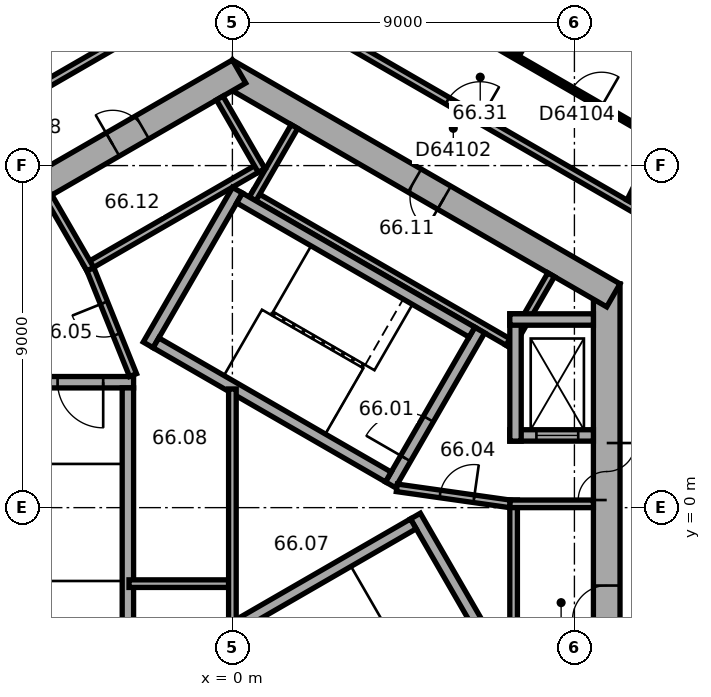
"""IFC4 building model, lengths in metres.
Left out: names, types, materials, properties, quantities, classifications, styles, units other than length and angle.
Written with IfcOpenShell. Run it as: python <this file> out.ifc"""

import sys

from ifc_helpers import new_model, si_unit, direction, frame, frame_2d, origin, place, context, subcontext, project, spatial, rectangle, extrude, element, fill, save


model = new_model("IFC4")
c1 = context("Model", 3, precision=1e-05, world=origin(), true_north=direction((0.0, 1.0)))
c2 = subcontext(c1, "Body", "Model", "MODEL_VIEW")
j1 = project(units=[si_unit("LENGTHUNIT", "METRE"), si_unit("PLANEANGLEUNIT", "RADIAN")], contexts=[c1])
p1 = place(None, origin())
s1 = spatial("IfcSite", under=j1, at=p1, CompositionType="ELEMENT")
p2 = place(p1, origin())
s2 = spatial("IfcBuilding", under=s1, at=p2, CompositionType="ELEMENT")
p3 = place(p2, frame((0.0, 0.0, 267.2)))
s3 = spatial("IfcBuildingStorey", under=s2, at=p3, CompositionType="ELEMENT", Elevation=267.2)
p4 = place(p3, frame((9.85, -5.889, 0.0), z_axis=(0.0, 0.0, 1.0), x_axis=(0.0, 1.0, 0.0)))
e1 = element("IfcWall", 1, at=p4, inside=s3, PredefinedType="SHEAR", context=c2, shape_type="SweptSolid", body=[
    extrude(rectangle(XDim=11.778, YDim=0.7, at=frame_2d((5.889, 0.0))), origin(), (0.0, 0.0, 1.0), 3.7),
])
p5 = place(p4, frame((6.089, 0.0, 0.0)))
e2 = element("IfcOpeningElement", 2, at=p5, cuts=e1, PredefinedType="OPENING", context=c2, shape_type="SweptSolid", body=[
    extrude(rectangle(XDim=1.5, YDim=2.1, at=frame_2d((0.75, 1.05))), frame((0.0, 0.36, 0.0), z_axis=(0.0, -1.0, 0.0), x_axis=(1.0, 0.0, 0.0)), (0.0, 0.0, 1.0), 0.72),
])
p6 = place(p4, frame((2.939, 0.0, 0.0)))
e3 = element("IfcOpeningElement", 3, at=p6, cuts=e1, PredefinedType="OPENING", context=c2, shape_type="SweptSolid", body=[
    extrude(rectangle(XDim=0.9, YDim=2.1, at=frame_2d((0.45, 1.05))), frame((0.0, 0.36, 0.0), z_axis=(0.0, -1.0, 0.0), x_axis=(1.0, 0.0, 0.0)), (0.0, 0.0, 1.0), 0.72),
])
p7 = place(p3, frame((10.025, 5.586, 0.0), z_axis=(0.0, 0.0, 1.0), x_axis=(-0.866026453023, 0.499998182661, 0.0)))
e4 = element("IfcWall", 4, at=p7, inside=s3, PredefinedType="SHEAR", context=c2, shape_type="SweptSolid", body=[
    extrude(rectangle(XDim=11.778, YDim=0.7, at=frame_2d((5.889, 0.0))), origin(), (0.0, 0.0, 1.0), 3.7),
])
p8 = place(p7, frame((5.139, 0.0, 0.0)))
e5 = element("IfcOpeningElement", 5, at=p8, cuts=e4, PredefinedType="OPENING", context=c2, shape_type="SweptSolid", body=[
    extrude(rectangle(XDim=0.9, YDim=2.1, at=frame_2d((0.45, 1.05))), frame((0.0, 0.36, 0.0), z_axis=(0.0, -1.0, 0.0), x_axis=(1.0, 0.0, 0.0)), (0.0, 0.0, 1.0), 0.72),
])
p9 = place(p3, frame((0.175, 11.475, 0.0), z_axis=(0.0, 0.0, 1.0), x_axis=(-0.866026453023, -0.499998182661, 0.0)))
e6 = element("IfcWall", 6, at=p9, inside=s3, PredefinedType="SHEAR", context=c2, shape_type="SweptSolid", body=[
    extrude(rectangle(XDim=11.778, YDim=0.7, at=frame_2d((5.889, 0.0))), origin(), (0.0, 0.0, 1.0), 3.7),
])
p10 = place(p9, frame((6.089, 0.0, 0.0)))
e7 = element("IfcOpeningElement", 7, at=p10, cuts=e6, PredefinedType="OPENING", context=c2, shape_type="SweptSolid", body=[
    extrude(rectangle(XDim=1.5, YDim=2.1, at=frame_2d((0.75, 1.05))), frame((0.0, 0.36, 0.0), z_axis=(0.0, -1.0, 0.0), x_axis=(1.0, 0.0, 0.0)), (0.0, 0.0, 1.0), 0.72),
])
p11 = place(p9, frame((2.939, 0.0, 0.0)))
e8 = element("IfcOpeningElement", 8, at=p11, cuts=e6, PredefinedType="OPENING", context=c2, shape_type="SweptSolid", body=[
    extrude(rectangle(XDim=0.9, YDim=2.1, at=frame_2d((0.45, 1.05))), frame((0.0, 0.36, 0.0), z_axis=(0.0, -1.0, 0.0), x_axis=(1.0, 0.0, 0.0)), (0.0, 0.0, 1.0), 0.72),
])
p12 = place(p3, frame((-2.624, 20.713, 0.0), z_axis=(0.0, 0.0, 1.0), x_axis=(-0.866026460444, -0.499998169808, 0.0)))
e9 = element("IfcWall", 9, at=p12, inside=s3, PredefinedType="STANDARD", context=c2, shape_type="SweptSolid", body=[
    extrude(rectangle(XDim=17.731, YDim=0.2, at=frame_2d((8.866, 0.0))), origin(), (0.0, 0.0, 1.0), 3.7),
])
p13 = place(p12, frame((1.203, 0.0, 0.9)))
e10 = element("IfcOpeningElement", 10, at=p13, cuts=e9, PredefinedType="OPENING", context=c2, shape_type="SweptSolid", body=[
    extrude(rectangle(XDim=2.0, YDim=2.0, at=frame_2d((1.0, 1.0))), frame((0.0, 0.11, 0.0), z_axis=(0.0, -1.0, 0.0), x_axis=(1.0, 0.0, 0.0)), (0.0, 0.0, 1.0), 0.22),
])
p14 = place(p12, frame((4.535, 0.0, 0.9)))
e11 = element("IfcOpeningElement", 11, at=p14, cuts=e9, PredefinedType="OPENING", context=c2, shape_type="SweptSolid", body=[
    extrude(rectangle(XDim=2.0, YDim=2.0, at=frame_2d((1.0, 1.0))), frame((0.0, 0.11, 0.0), z_axis=(0.0, -1.0, 0.0), x_axis=(1.0, 0.0, 0.0)), (0.0, 0.0, 1.0), 0.22),
])
p15 = place(p12, frame((7.867, 0.0, 0.9)))
e12 = element("IfcOpeningElement", 12, at=p15, cuts=e9, PredefinedType="OPENING", context=c2, shape_type="SweptSolid", body=[
    extrude(rectangle(XDim=2.0, YDim=2.0, at=frame_2d((1.0, 1.0))), frame((0.0, 0.11, 0.0), z_axis=(0.0, -1.0, 0.0), x_axis=(1.0, 0.0, 0.0)), (0.0, 0.0, 1.0), 0.22),
])
p16 = place(p12, frame((11.198, 0.0, 0.9)))
e13 = element("IfcOpeningElement", 13, at=p16, cuts=e9, PredefinedType="OPENING", context=c2, shape_type="SweptSolid", body=[
    extrude(rectangle(XDim=2.0, YDim=2.0, at=frame_2d((1.0, 1.0))), frame((0.0, 0.11, 0.0), z_axis=(0.0, -1.0, 0.0), x_axis=(1.0, 0.0, 0.0)), (0.0, 0.0, 1.0), 0.22),
])
p17 = place(p12, frame((14.53, 0.0, 0.9)))
e14 = element("IfcOpeningElement", 14, at=p17, cuts=e9, PredefinedType="OPENING", context=c2, shape_type="SweptSolid", body=[
    extrude(rectangle(XDim=2.0, YDim=2.0, at=frame_2d((1.0, 1.0))), frame((0.0, 0.11, 0.0), z_axis=(0.0, -1.0, 0.0), x_axis=(1.0, 0.0, 0.0)), (0.0, 0.0, 1.0), 0.22),
])
p18 = place(p3, frame((7.4, -5.2, 0.0), z_axis=(0.0, 0.0, 1.0), x_axis=(0.0, 1.0, 0.0)))
e15 = element("IfcWall", 15, at=p18, inside=s3, PredefinedType="PARTITIONING", context=c2, shape_type="SweptSolid", body=[
    extrude(rectangle(XDim=5.4, YDim=0.2, at=frame_2d((2.7, 0.0))), origin(), (0.0, 0.0, 1.0), 3.42),
])
p19 = place(p3, frame((7.3, 0.1, 0.0), z_axis=(0.0, 0.0, 1.0), x_axis=(1.0, 0.0, 0.0)))
e16 = element("IfcWall", 16, at=p19, inside=s3, PredefinedType="PARTITIONING", context=c2, shape_type="SweptSolid", body=[
    extrude(rectangle(XDim=2.2, YDim=0.2, at=frame_2d((1.1, 0.0))), origin(), (0.0, 0.0, 1.0), 3.42),
])
p20 = place(p3, frame((7.424, 4.259, 0.0), z_axis=(0.0, 0.0, 1.0), x_axis=(-0.866026010844, 0.49999894854, 0.0)))
e17 = element("IfcWall", 17, at=p20, inside=s3, PredefinedType="PARTITIONING", context=c2, shape_type="SweptSolid", body=[
    extrude(rectangle(XDim=8.0, YDim=0.2, at=frame_2d((4.0, 0.0))), origin(), (0.0, 0.0, 1.0), 3.42),
])
for number, where, z_axis, x_axis in (
    (18, (7.287, 4.222, 0.0), (0.0, 0.0, 1.0), (0.5, 0.866, 0.0)),
    (19, (0.532, 8.122, 0.0), (0.0, 0.0, 1.0), (0.5, 0.866, 0.0)),
):
    element("IfcWall", number, at=place(p3, frame(where, z_axis=z_axis, x_axis=x_axis)), inside=s3, PredefinedType="PARTITIONING", context=c2, shape_type="SweptSolid", body=[
        extrude(rectangle(XDim=2.2, YDim=0.2, at=frame_2d((1.1, 0.0))), origin(), (0.0, 0.0, 1.0), 3.42),
    ])
p21 = place(p3, frame((0.803, 9.009, 0.0), z_axis=(0.0, 0.0, 1.0), x_axis=(-0.866028230842, -0.499995103361, 0.0)))
e20 = element("IfcWall", 20, at=p21, inside=s3, PredefinedType="PARTITIONING", context=c2, shape_type="SweptSolid", body=[
    extrude(rectangle(XDim=5.4, YDim=0.2, at=frame_2d((2.7, 0.0))), origin(), (0.0, 0.0, 1.0), 3.42),
])
p22 = place(p3, frame((0.767, 8.872, 0.0), z_axis=(0.0, 0.0, 1.0), x_axis=(-0.499994660107, 0.866028486751, 0.0)))
e21 = element("IfcWall", 21, at=p22, inside=s3, PredefinedType="PARTITIONING", context=c2, shape_type="SweptSolid", body=[
    extrude(rectangle(XDim=2.2, YDim=0.2, at=frame_2d((1.1, 0.0))), origin(), (0.0, 0.0, 1.0), 3.42),
])
p23 = place(p3, frame((-3.737, 6.272, 0.0), z_axis=(0.0, 0.0, 1.0), x_axis=(-0.50002983664, 0.866008176907, 0.0)))
e22 = element("IfcWall", 22, at=p23, inside=s3, PredefinedType="PARTITIONING", context=c2, shape_type="SweptSolid", body=[
    extrude(rectangle(XDim=2.2, YDim=0.2, at=frame_2d((1.1, 0.0))), origin(), (0.0, 0.0, 1.0), 3.42),
])
p24 = place(p3, frame((4.158, 0.602, 0.0), z_axis=(0.0, 0.0, 1.0), x_axis=(0.499977259774, 0.866038532462, 0.0)))
e23 = element("IfcWall", 23, at=p24, inside=s3, PredefinedType="SHEAR", context=c2, shape_type="SweptSolid", body=[
    extrude(rectangle(XDim=4.7, YDim=0.3, at=frame_2d((2.35, 0.0))), origin(), (0.0, 0.0, 1.0), 3.42),
])
p25 = place(p24, frame((0.8, 0.0, 0.0)))
e24 = element("IfcOpeningElement", 24, at=p25, cuts=e23, PredefinedType="OPENING", context=c2, shape_type="SweptSolid", body=[
    extrude(rectangle(XDim=1.2, YDim=2.1, at=frame_2d((0.6, 1.05))), frame((0.0, 0.16, 0.0), z_axis=(0.0, -1.0, 0.0), x_axis=(1.0, 0.0, 0.0)), (0.0, 0.0, 1.0), 0.32),
])
p26 = place(p3, frame((-2.216, 4.282, 0.0), z_axis=(0.0, 0.0, 1.0), x_axis=(0.499977259774, 0.866038532462, 0.0)))
e25 = element("IfcWall", 25, at=p26, inside=s3, PredefinedType="SHEAR", context=c2, shape_type="SweptSolid", body=[
    extrude(rectangle(XDim=4.7, YDim=0.3, at=frame_2d((2.35, 0.0))), origin(), (0.0, 0.0, 1.0), 3.42),
])
for number, where, z_axis, x_axis in (
    (26, (4.103, 0.807, 0.0), (0.0, 0.0, 1.0), (-0.866, 0.5, 0.0)),
    (27, (6.303, 4.617, 0.0), (0.0, 0.0, 1.0), (-0.866, 0.5, 0.0)),
):
    element("IfcWall", number, at=place(p3, frame(where, z_axis=z_axis, x_axis=x_axis)), inside=s3, PredefinedType="SHEAR", context=c2, shape_type="SweptSolid", body=[
        extrude(rectangle(XDim=7.06, YDim=0.3, at=frame_2d((3.53, 0.0))), origin(), (0.0, 0.0, 1.0), 3.42),
    ])
p27 = place(p3, frame((-2.6, 3.3, 0.0), z_axis=(0.0, 0.0, 1.0), x_axis=(-1.0, 0.0, 0.0)))
e28 = element("IfcWall", 28, at=p27, inside=s3, PredefinedType="SHEAR", context=c2, shape_type="SweptSolid", body=[
    extrude(rectangle(XDim=4.7, YDim=0.3, at=frame_2d((2.35, 0.0))), origin(), (0.0, 0.0, 1.0), 3.42),
])
p28 = place(p27, frame((0.8, 0.0, 0.0)))
e29 = element("IfcOpeningElement", 29, at=p28, cuts=e28, PredefinedType="OPENING", context=c2, shape_type="SweptSolid", body=[
    extrude(rectangle(XDim=1.2, YDim=2.1, at=frame_2d((0.6, 1.05))), frame((0.0, 0.16, 0.0), z_axis=(0.0, -1.0, 0.0), x_axis=(1.0, 0.0, 0.0)), (0.0, 0.0, 1.0), 0.32),
])
p29 = place(p3, frame((-2.75, 3.15, 0.0), z_axis=(0.0, 0.0, 1.0), x_axis=(0.0, -1.0, 0.0)))
e30 = element("IfcWall", 30, at=p29, inside=s3, PredefinedType="SHEAR", context=c2, shape_type="SweptSolid", body=[
    extrude(rectangle(XDim=7.06, YDim=0.3, at=frame_2d((3.53, 0.0))), origin(), (0.0, 0.0, 1.0), 3.42),
])
p30 = place(p3, frame((4.816, -0.222, 0.0), z_axis=(0.0, 0.0, 1.0), x_axis=(0.499977259774, -0.866038532462, 0.0)))
e31 = element("IfcWall", 31, at=p30, inside=s3, PredefinedType="SHEAR", context=c2, shape_type="SweptSolid", body=[
    extrude(rectangle(XDim=4.7, YDim=0.3, at=frame_2d((2.35, 0.0))), origin(), (0.0, 0.0, 1.0), 3.42),
])
p31 = place(p3, frame((-1.353, -3.957, 0.0), z_axis=(0.0, 0.0, 1.0), x_axis=(0.866027801685, 0.499995846692, 0.0)))
e32 = element("IfcWall", 32, at=p31, inside=s3, PredefinedType="SHEAR", context=c2, shape_type="SweptSolid", body=[
    extrude(rectangle(XDim=7.06, YDim=0.3, at=frame_2d((3.53, 0.0))), origin(), (0.0, 0.0, 1.0), 3.42),
])
p32 = place(p3, frame((7.3, 1.9, 0.0), z_axis=(0.0, 0.0, 1.0), x_axis=(1.0, 0.0, 0.0)))
e33 = element("IfcWall", 33, at=p32, inside=s3, PredefinedType="SHEAR", context=c2, shape_type="SweptSolid", body=[
    extrude(rectangle(XDim=2.2, YDim=0.3, at=frame_2d((1.1, 0.0))), origin(), (0.0, 0.0, 1.0), 3.42),
])
p33 = place(p32, frame((0.7, 0.0, 0.0)))
e34 = element("IfcOpeningElement", 34, at=p33, cuts=e33, PredefinedType="OPENING", context=c2, shape_type="SweptSolid", body=[
    extrude(rectangle(XDim=1.1, YDim=2.1, at=frame_2d((0.55, 1.05))), frame((0.0, 0.16, 0.0), z_axis=(0.0, -1.0, 0.0), x_axis=(1.0, 0.0, 0.0)), (0.0, 0.0, 1.0), 0.32),
])
p34 = place(p3, frame((7.45, 1.75, 0.0), z_axis=(0.0, 0.0, 1.0), x_axis=(0.0, 1.0, 0.0)))
e35 = element("IfcWall", 35, at=p34, inside=s3, PredefinedType="SHEAR", context=c2, shape_type="SweptSolid", body=[
    extrude(rectangle(XDim=3.35, YDim=0.3, at=frame_2d((1.675, 0.0))), origin(), (0.0, 0.0, 1.0), 3.42),
])
p35 = place(p3, frame((7.3, 4.95, 0.0), z_axis=(0.0, 0.0, 1.0), x_axis=(1.0, 0.0, 0.0)))
e36 = element("IfcWall", 36, at=p35, inside=s3, PredefinedType="SHEAR", context=c2, shape_type="SweptSolid", body=[
    extrude(rectangle(XDim=2.2, YDim=0.3, at=frame_2d((1.1, 0.0))), origin(), (0.0, 0.0, 1.0), 3.42),
])
p36 = place(p3, frame((4.327, 0.521, 0.0), z_axis=(0.0, 0.0, 1.0), x_axis=(0.990124376366, -0.14019172346, 0.0)))
e37 = element("IfcWall", 37, at=p36, inside=s3, PredefinedType="PARTITIONING", context=c2, shape_type="SweptSolid", body=[
    extrude(rectangle(XDim=3.002, YDim=0.2, at=frame_2d((1.501, 0.0))), origin(), (0.0, 0.0, 1.0), 3.42),
])
p37 = place(p36, frame((1.15, 0.0, 0.0)))
e38 = element("IfcOpeningElement", 38, at=p37, cuts=e37, PredefinedType="OPENING", context=c2, shape_type="SweptSolid", body=[
    extrude(rectangle(XDim=0.9, YDim=2.1, at=frame_2d((0.45, 1.05))), frame((0.0, 0.11, 0.0), z_axis=(0.0, -1.0, 0.0), x_axis=(1.0, 0.0, 0.0)), (0.0, 0.0, 1.0), 0.22),
])
p38 = place(p3, frame((-2.615, 3.487, 0.0), z_axis=(0.0, 0.0, 1.0), x_axis=(-0.373576831041, 0.92759924068, 0.0)))
e39 = element("IfcWall", 39, at=p38, inside=s3, PredefinedType="PARTITIONING", context=c2, shape_type="SweptSolid", body=[
    extrude(rectangle(XDim=3.002, YDim=0.2, at=frame_2d((1.501, 0.0))), origin(), (0.0, 0.0, 1.0), 3.42),
])
p39 = place(p38, frame((1.15, 0.0, 0.0)))
e40 = element("IfcOpeningElement", 40, at=p39, cuts=e39, PredefinedType="OPENING", context=c2, shape_type="SweptSolid", body=[
    extrude(rectangle(XDim=0.9, YDim=2.1, at=frame_2d((0.45, 1.05))), frame((0.0, 0.11, 0.0), z_axis=(0.0, -1.0, 0.0), x_axis=(1.0, 0.0, 0.0)), (0.0, 0.0, 1.0), 0.22),
])
p40 = place(p3, frame((-2.72, -2.0, 0.0), z_axis=(0.0, 0.0, 1.0), x_axis=(1.0, 0.0, 0.0)))
e41 = element("IfcWall", 41, at=p40, inside=s3, PredefinedType="PARTITIONING", context=c2, shape_type="SweptSolid", body=[
    extrude(rectangle(XDim=2.62, YDim=0.2, at=frame_2d((1.31, 0.0))), origin(), (0.0, 0.0, 1.0), 3.42),
])
p41 = place(p3, frame((0.0, -3.122, 0.0), z_axis=(0.0, 0.0, 1.0), x_axis=(0.0, 1.0, 0.0)))
e42 = element("IfcWall", 42, at=p41, inside=s3, PredefinedType="PARTITIONING", context=c2, shape_type="SweptSolid", body=[
    extrude(rectangle(XDim=6.245, YDim=0.2, at=frame_2d((3.122, 0.0))), origin(), (0.0, 0.0, 1.0), 3.42),
])
p42 = place(p3, frame((-0.95, 13.423, 0.0), z_axis=(0.0, 0.0, 1.0), x_axis=(-0.86603557629, -0.499982380289, 0.0)))
e43 = element("IfcWall", 43, at=p42, inside=s3, PredefinedType="PARTITIONING", context=c2, shape_type="SweptSolid", body=[
    extrude(rectangle(XDim=4.906, YDim=0.2, at=frame_2d((2.453, 0.0))), origin(), (0.0, 0.0, 1.0), 3.42),
])
p43 = place(p3, frame((10.072, 16.376, 0.0), z_axis=(0.0, 0.0, 1.0), x_axis=(-0.499972385701, -0.86604134632, 0.0)))
e44 = element("IfcWall", 44, at=p43, inside=s3, PredefinedType="PARTITIONING", context=c2, shape_type="SweptSolid", body=[
    extrude(rectangle(XDim=5.158, YDim=0.12, at=frame_2d((2.579, 0.0))), origin(), (0.0, 0.0, 1.0), 2.87),
])
p44 = place(p3, frame((11.15, 7.534, 0.0), z_axis=(0.0, 0.0, 1.0), x_axis=(-0.866026603062, 0.499997922785, 0.0)))
e45 = element("IfcWall", 45, at=p44, inside=s3, PredefinedType="PARTITIONING", context=c2, shape_type="SweptSolid", body=[
    extrude(rectangle(XDim=11.738, YDim=0.2, at=frame_2d((5.869, 0.0))), origin(), (0.0, 0.0, 1.0), 3.42),
])
p45 = place(p44, frame((5.345, 0.0, 0.0)))
e46 = element("IfcOpeningElement", 46, at=p45, cuts=e45, PredefinedType="OPENING", context=c2, shape_type="SweptSolid", body=[
    extrude(rectangle(XDim=1.0, YDim=2.1, at=frame_2d((0.5, 1.05))), frame((0.0, 0.11, 0.0), z_axis=(0.0, -1.0, 0.0), x_axis=(1.0, 0.0, 0.0)), (0.0, 0.0, 1.0), 0.22),
])
p46 = place(p3, frame((11.187, 9.707, 0.0), z_axis=(0.0, 0.0, 1.0), x_axis=(-0.866033133531, 0.499986611447, 0.0)))
e47 = element("IfcWall", 47, at=p46, inside=s3, PredefinedType="PARTITIONING", context=c2, shape_type="SweptSolid", body=[
    extrude(rectangle(XDim=9.814, YDim=0.12, at=frame_2d((4.907, 0.0))), origin(), (0.0, 0.0, 1.0), 3.42),
])
p47 = place(p46, frame((8.349, 0.0, 0.0)))
e48 = element("IfcOpeningElement", 48, at=p47, cuts=e47, PredefinedType="OPENING", context=c2, shape_type="SweptSolid", body=[
    extrude(rectangle(XDim=1.0, YDim=2.1, at=frame_2d((0.5, 1.05))), frame((0.0, 0.07, 0.0), z_axis=(0.0, -1.0, 0.0), x_axis=(1.0, 0.0, 0.0)), (0.0, 0.0, 1.0), 0.14),
])
p48 = place(p46, frame((1.7, 0.0, 0.0)))
e49 = element("IfcOpeningElement", 49, at=p48, cuts=e47, PredefinedType="OPENING", context=c2, shape_type="SweptSolid", body=[
    extrude(rectangle(XDim=0.9, YDim=2.1, at=frame_2d((0.45, 1.05))), frame((0.0, 0.07, 0.0), z_axis=(0.0, -1.0, 0.0), x_axis=(1.0, 0.0, 0.0)), (0.0, 0.0, 1.0), 0.14),
])
p49 = place(p46, frame((5.642, 0.0, 0.0)))
e50 = element("IfcOpeningElement", 50, at=p49, cuts=e47, PredefinedType="OPENING", context=c2, shape_type="SweptSolid", body=[
    extrude(rectangle(XDim=0.9, YDim=2.1, at=frame_2d((0.45, 1.05))), frame((0.0, 0.07, 0.0), z_axis=(0.0, -1.0, 0.0), x_axis=(1.0, 0.0, 0.0)), (0.0, 0.0, 1.0), 0.14),
])
p50 = place(p3, frame((13.405, 13.933, 0.0), z_axis=(0.0, 0.0, 1.0), x_axis=(-0.446187838644, -0.894939334618, 0.0)))
e51 = element("IfcWall", 51, at=p50, inside=s3, PredefinedType="PARTITIONING", context=c2, shape_type="SweptSolid", body=[
    extrude(rectangle(XDim=6.571, YDim=0.2, at=frame_2d((3.286, 0.0))), origin(), (0.0, 0.0, 1.0), 3.42),
])
p51 = place(p5, origin())
e52 = element("IfcDoor", 52, at=p51, inside=s3, OperationType="DOUBLE_DOOR_SINGLE_SWING", PredefinedType="DOOR", context=c2, shape_type="SweptSolid", body=[
    extrude(rectangle(XDim=1.5, YDim=2.1, at=frame_2d((0.75, 1.05))), frame((0.0, 0.025, 0.0), z_axis=(0.0, -1.0, 0.0), x_axis=(1.0, 0.0, 0.0)), (0.0, 0.0, 1.0), 0.05),
])
fill(e2, e52)
p52 = place(p25, origin())
e53 = element("IfcDoor", 53, at=p52, inside=s3, OperationType="SINGLE_SWING_RIGHT", PredefinedType="DOOR", context=c2, shape_type="SweptSolid", body=[
    extrude(rectangle(XDim=1.2, YDim=2.1, at=frame_2d((0.6, 1.05))), frame((0.0, 0.025, 0.0), z_axis=(0.0, -1.0, 0.0), x_axis=(1.0, 0.0, 0.0)), (0.0, 0.0, 1.0), 0.05),
])
fill(e24, e53)
p53 = place(p28, origin())
e54 = element("IfcDoor", 54, at=p53, inside=s3, OperationType="SINGLE_SWING_RIGHT", PredefinedType="DOOR", context=c2, shape_type="SweptSolid", body=[
    extrude(rectangle(XDim=1.2, YDim=2.1, at=frame_2d((0.6, 1.05))), frame((0.0, 0.025, 0.0), z_axis=(0.0, -1.0, 0.0), x_axis=(1.0, 0.0, 0.0)), (0.0, 0.0, 1.0), 0.05),
])
fill(e29, e54)
p54 = place(p37, origin())
e55 = element("IfcDoor", 55, at=p54, inside=s3, OperationType="SINGLE_SWING_LEFT", PredefinedType="DOOR", context=c2, shape_type="SweptSolid", body=[
    extrude(rectangle(XDim=0.9, YDim=2.1, at=frame_2d((0.45, 1.05))), frame((0.0, 0.025, 0.0), z_axis=(0.0, -1.0, 0.0), x_axis=(1.0, 0.0, 0.0)), (0.0, 0.0, 1.0), 0.05),
])
fill(e38, e55)
p55 = place(p39, origin())
e56 = element("IfcDoor", 56, at=p55, inside=s3, OperationType="SINGLE_SWING_LEFT", PredefinedType="DOOR", context=c2, shape_type="SweptSolid", body=[
    extrude(rectangle(XDim=0.9, YDim=2.1, at=frame_2d((0.45, 1.05))), frame((0.0, 0.025, 0.0), z_axis=(0.0, -1.0, 0.0), x_axis=(1.0, 0.0, 0.0)), (0.0, 0.0, 1.0), 0.05),
])
fill(e40, e56)
p56 = place(p6, origin())
e57 = element("IfcDoor", 57, at=p56, inside=s3, OperationType="SINGLE_SWING_LEFT", PredefinedType="DOOR", context=c2, shape_type="SweptSolid", body=[
    extrude(rectangle(XDim=0.9, YDim=2.1, at=frame_2d((0.45, 1.05))), frame((0.0, 0.025, 0.0), z_axis=(0.0, -1.0, 0.0), x_axis=(1.0, 0.0, 0.0)), (0.0, 0.0, 1.0), 0.05),
])
fill(e3, e57)
p57 = place(p8, origin())
e58 = element("IfcDoor", 58, at=p57, inside=s3, OperationType="SINGLE_SWING_LEFT", PredefinedType="DOOR", context=c2, shape_type="SweptSolid", body=[
    extrude(rectangle(XDim=0.9, YDim=2.1, at=frame_2d((0.45, 1.05))), frame((0.0, 0.025, 0.0), z_axis=(0.0, -1.0, 0.0), x_axis=(1.0, 0.0, 0.0)), (0.0, 0.0, 1.0), 0.05),
])
fill(e5, e58)
p58 = place(p11, origin())
e59 = element("IfcDoor", 59, at=p58, inside=s3, OperationType="SINGLE_SWING_LEFT", PredefinedType="DOOR", context=c2, shape_type="SweptSolid", body=[
    extrude(rectangle(XDim=0.9, YDim=2.1, at=frame_2d((0.45, 1.05))), frame((0.0, 0.025, 0.0), z_axis=(0.0, -1.0, 0.0), x_axis=(1.0, 0.0, 0.0)), (0.0, 0.0, 1.0), 0.05),
])
fill(e8, e59)
p59 = place(p33, origin())
e60 = element("IfcDoor", 60, at=p59, inside=s3, OperationType="DOUBLE_DOOR_SLIDING", PredefinedType="DOOR", context=c2, shape_type="SweptSolid", body=[
    extrude(rectangle(XDim=1.1, YDim=2.1, at=frame_2d((0.55, 1.05))), frame((0.0, 0.025, 0.0), z_axis=(0.0, -1.0, 0.0), x_axis=(1.0, 0.0, 0.0)), (0.0, 0.0, 1.0), 0.05),
])
fill(e34, e60)
p60 = place(p45, origin())
e61 = element("IfcDoor", 61, at=p60, inside=s3, OperationType="SINGLE_SWING_LEFT", PredefinedType="DOOR", context=c2, shape_type="SweptSolid", body=[
    extrude(rectangle(XDim=1.0, YDim=2.1, at=frame_2d((0.5, 1.05))), frame((0.0, 0.025, 0.0), z_axis=(0.0, -1.0, 0.0), x_axis=(1.0, 0.0, 0.0)), (0.0, 0.0, 1.0), 0.05),
])
fill(e46, e61)
p61 = place(p48, origin())
e62 = element("IfcDoor", 62, at=p61, inside=s3, OperationType="SINGLE_SWING_LEFT", PredefinedType="DOOR", context=c2, shape_type="SweptSolid", body=[
    extrude(rectangle(XDim=0.9, YDim=2.1, at=frame_2d((0.45, 1.05))), frame((0.0, 0.025, 0.0), z_axis=(0.0, -1.0, 0.0), x_axis=(1.0, 0.0, 0.0)), (0.0, 0.0, 1.0), 0.05),
])
fill(e49, e62)
save(model, sys.argv[1])
